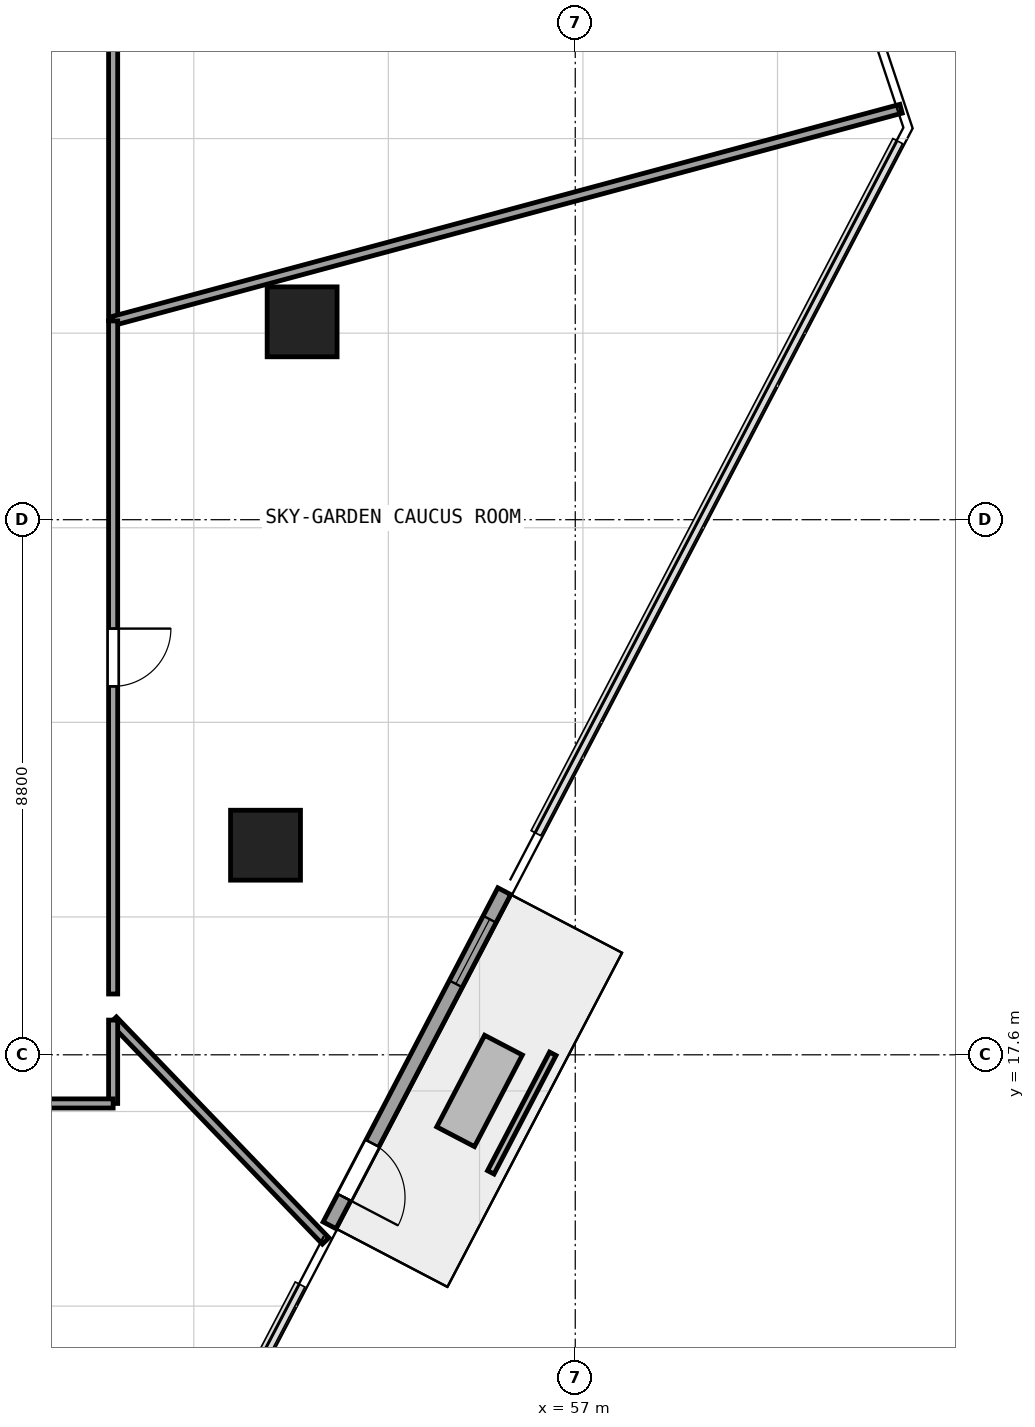
"""IFC4 building model, lengths in metres.
Left out: names, types, materials, properties, quantities, classifications, styles, units other than length and angle.
Written with IfcOpenShell. Run it as: python <this file> out.ifc"""

import sys

from ifc_helpers import new_model, si_unit, direction, frame, frame_2d, origin, origin_2d, place, context, subcontext, project, spatial, rectangle, extrude, element, fill, save


model = new_model("IFC4")
c1 = context("Model", 3, precision=1e-05, world=origin(), true_north=direction((0.0, 1.0)))
c2 = subcontext(c1, "Body", "Model", "MODEL_VIEW")
j1 = project(units=[si_unit("LENGTHUNIT", "METRE"), si_unit("PLANEANGLEUNIT", "RADIAN")], contexts=[c1])
p1 = place(None, origin())
s1 = spatial("IfcSite", under=j1, at=p1, CompositionType="ELEMENT")
p2 = place(p1, origin())
s2 = spatial("IfcBuilding", under=s1, at=p2, CompositionType="ELEMENT")
p3 = place(p2, frame((0.0, 0.0, 76.35)))
s3 = spatial("IfcBuildingStorey", under=s2, at=p3, CompositionType="ELEMENT", Elevation=76.35)
for number, where, z_axis, x_axis in (
    (1, (52.508, 29.654, -0.405), (0.0, 0.0, 1.0), (1.0, 0.0, 0.0)),
    (2, (51.906, 21.047, -0.405), (0.0, 0.0, 1.0), (1.0, 0.0, 0.0)),
):
    element("IfcColumn", number, at=place(p3, frame(where, z_axis=z_axis, x_axis=x_axis)), inside=s3, PredefinedType="COLUMN", context=c2, shape_type="SweptSolid", body=[
        extrude(rectangle(XDim=1.15, YDim=1.15, at=origin_2d()), origin(), (0.0, 0.0, 1.0), 3.575),
    ])
p4 = place(p3, frame((55.833, 20.291, 0.0), z_axis=(0.0, 0.0, 1.0), x_axis=(-0.463330108623, -0.8861857652, 0.0)))
e3 = element("IfcWall", 3, at=p4, inside=s3, PredefinedType="SOLIDWALL", context=c2, shape_type="SweptSolid", body=[
    extrude(rectangle(XDim=6.201, YDim=0.24, at=frame_2d((3.101, 0.0))), origin(), (0.0, 0.0, 1.0), 3.17),
])
p5 = place(p4, frame((4.681, 0.0, 0.0)))
e4 = element("IfcOpeningElement", 4, at=p5, cuts=e3, PredefinedType="OPENING", context=c2, shape_type="SweptSolid", body=[
    extrude(rectangle(XDim=1.0, YDim=2.15, at=frame_2d((0.5, 1.075))), frame((0.0, 0.13, 0.0), z_axis=(0.0, -1.0, 0.0), x_axis=(1.0, 0.0, 0.0)), (0.0, 0.0, 1.0), 0.26),
])
p6 = place(p4, frame((0.52, 0.0, 0.2)))
e5 = element("IfcOpeningElement", 5, at=p6, cuts=e3, PredefinedType="OPENING", context=c2, shape_type="SweptSolid", body=[
    extrude(rectangle(XDim=1.2, YDim=1.8, at=frame_2d((0.6, 0.9))), frame((0.0, 0.13, 0.0), z_axis=(0.0, -1.0, 0.0), x_axis=(1.0, 0.0, 0.0)), (0.0, 0.0, 1.0), 0.26),
])
p7 = place(p3, frame((49.4, 34.2, 0.0), z_axis=(0.0, 0.0, 1.0), x_axis=(0.0, -1.0, 0.0)))
e6 = element("IfcWall", 6, at=p7, inside=s3, PredefinedType="PARTITIONING", context=c2, shape_type="SweptSolid", body=[
    extrude(rectangle(XDim=4.531, YDim=0.15, at=frame_2d((2.266, 0.0))), origin(), (0.0, 0.0, 1.0), 2.455),
])
p8 = place(p3, frame((49.4, 29.669, 0.0), z_axis=(0.0, 0.0, 1.0), x_axis=(0.965609785955, 0.259995656249, 0.0)))
e7 = element("IfcWall", 7, at=p8, inside=s3, PredefinedType="PARTITIONING", context=c2, shape_type="SweptSolid", body=[
    extrude(rectangle(XDim=13.419, YDim=0.15, at=frame_2d((6.71, 0.0))), origin(), (0.0, 0.0, 1.0), 2.455),
])
p9 = place(p3, frame((52.895, 14.539, 0.0), z_axis=(0.0, 0.0, 1.0), x_axis=(-0.693414536175, 0.720538882379, 0.0)))
e8 = element("IfcWall", 8, at=p9, inside=s3, PredefinedType="PARTITIONING", context=c2, shape_type="SweptSolid", body=[
    extrude(rectangle(XDim=5.041, YDim=0.15, at=frame_2d((2.52, 0.0))), origin(), (0.0, 0.0, 1.0), 3.17),
])
p10 = place(p3, frame((49.4, 18.171, 0.0), z_axis=(0.0, 0.0, 1.0), x_axis=(0.0, -1.0, 0.0)))
e9 = element("IfcWall", 9, at=p10, inside=s3, PredefinedType="PARTITIONING", context=c2, shape_type="SweptSolid", body=[
    extrude(rectangle(XDim=1.371, YDim=0.15, at=frame_2d((0.686, 0.0))), origin(), (0.0, 0.0, 1.0), 3.17),
])
p11 = place(p3, frame((49.4, 16.8, 0.0), z_axis=(0.0, 0.0, 1.0), x_axis=(-1.0, 0.0, 0.0)))
e10 = element("IfcWall", 10, at=p11, inside=s3, PredefinedType="PARTITIONING", context=c2, shape_type="SweptSolid", body=[
    extrude(rectangle(XDim=11.191, YDim=0.15, at=frame_2d((5.595, 0.0))), origin(), (0.0, 0.0, 1.0), 2.455),
])
p12 = place(p11, frame((5.12, 0.0, 0.0)))
e11 = element("IfcOpeningElement", 11, at=p12, cuts=e10, PredefinedType="OPENING", context=c2, shape_type="SweptSolid", body=[
    extrude(rectangle(XDim=0.95, YDim=2.15, at=frame_2d((0.475, 1.075))), frame((0.0, 0.085, 0.0), z_axis=(0.0, -1.0, 0.0), x_axis=(1.0, 0.0, 0.0)), (0.0, 0.0, 1.0), 0.17),
])
p13 = place(p3, frame((49.4, 29.669, 0.0), z_axis=(0.0, 0.0, 1.0), x_axis=(0.0, -1.0, 0.0)))
e12 = element("IfcWall", 12, at=p13, inside=s3, PredefinedType="PARTITIONING", context=c2, shape_type="SweptSolid", body=[
    extrude(rectangle(XDim=11.069, YDim=0.15, at=frame_2d((5.534, 0.0))), origin(), (0.0, 0.0, 1.0), 2.455),
])
p14 = place(p13, frame((5.06, 0.0, 0.0)))
e13 = element("IfcOpeningElement", 13, at=p14, cuts=e12, PredefinedType="OPENING", context=c2, shape_type="SweptSolid", body=[
    extrude(rectangle(XDim=0.95, YDim=2.15, at=frame_2d((0.475, 1.075))), frame((0.0, 0.085, 0.0), z_axis=(0.0, -1.0, 0.0), x_axis=(1.0, 0.0, 0.0)), (0.0, 0.0, 1.0), 0.17),
])
p15 = place(p5, origin())
e14 = element("IfcDoor", 14, at=p15, inside=s3, OperationType="SINGLE_SWING_RIGHT", PredefinedType="DOOR", context=c2, shape_type="SweptSolid", body=[
    extrude(rectangle(XDim=1.0, YDim=2.15, at=frame_2d((0.5, 1.075))), frame((0.0, 0.025, 0.0), z_axis=(0.0, -1.0, 0.0), x_axis=(1.0, 0.0, 0.0)), (0.0, 0.0, 1.0), 0.05),
])
fill(e4, e14)
p16 = place(p6, origin())
e15 = element("IfcWindow", 15, at=p16, inside=s3, PartitioningType="SINGLE_PANEL", PredefinedType="WINDOW", context=c2, shape_type="SweptSolid", body=[
    extrude(rectangle(XDim=1.2, YDim=1.8, at=frame_2d((0.6, 0.9))), frame((0.0, 0.03, 0.0), z_axis=(0.0, -1.0, 0.0), x_axis=(1.0, 0.0, 0.0)), (0.0, 0.0, 1.0), 0.06),
])
fill(e5, e15)
p17 = place(p14, origin())
e16 = element("IfcDoor", 16, at=p17, inside=s3, OperationType="SINGLE_SWING_LEFT", PredefinedType="DOOR", context=c2, shape_type="SweptSolid", body=[
    extrude(rectangle(XDim=0.95, YDim=2.15, at=frame_2d((0.475, 1.075))), frame((0.0, 0.025, 0.0), z_axis=(0.0, -1.0, 0.0), x_axis=(1.0, 0.0, 0.0)), (0.0, 0.0, 1.0), 0.05),
])
fill(e13, e16)
save(model, sys.argv[1])
